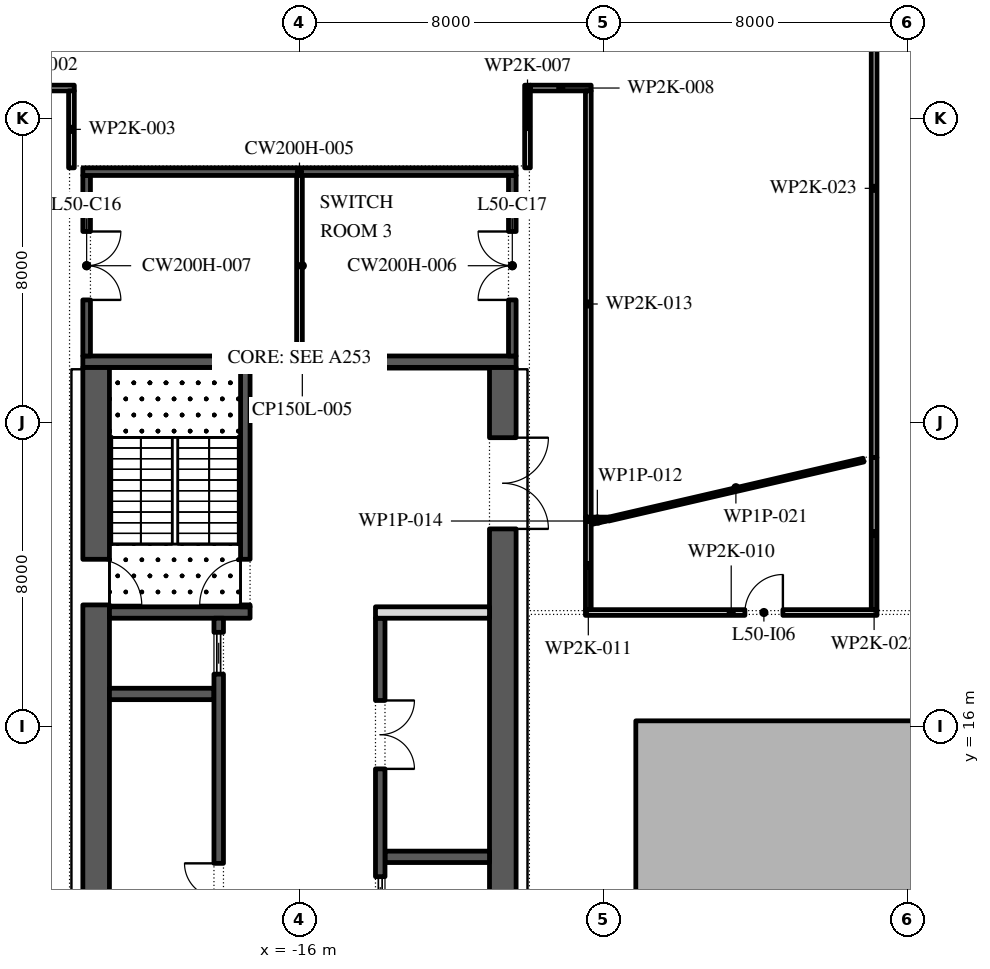
"""IFC4 building model, lengths in metres.
Left out: names, types, materials, properties, quantities, classifications, styles, units other than length and angle.
Written with IfcOpenShell. Run it as: python <this file> out.ifc"""

import sys

from ifc_helpers import new_model, si_unit, direction, frame, frame_2d, origin, place, context, subcontext, project, spatial, polyline, rectangle, outline, extrude, element, fill, save


model = new_model("IFC4")
c1 = context("Model", 3, precision=1e-05, world=origin(), true_north=direction((0.0, 1.0)))
c2 = subcontext(c1, "Body", "Model", "MODEL_VIEW")
j1 = project(units=[si_unit("LENGTHUNIT", "METRE"), si_unit("PLANEANGLEUNIT", "RADIAN")], contexts=[c1])
p1 = place(None, origin())
s1 = spatial("IfcSite", under=j1, at=p1, CompositionType="ELEMENT")
p2 = place(p1, origin())
s2 = spatial("IfcBuilding", under=s1, at=p2, CompositionType="ELEMENT")
p3 = place(p2, frame((0.0, 0.0, 226.2)))
s3 = spatial("IfcBuildingStorey", under=s2, at=p3, CompositionType="ELEMENT", Elevation=226.2)
p4 = place(p3, origin())
e1 = element("IfcWall", 1, at=p4, inside=s3, PredefinedType="STANDARD", context=c2, shape_type="SweptSolid", body=[
    extrude(outline(polyline([(-7.15, -2.15), (7.15, -2.15), (7.15, 16.15), (-7.15, 16.15), (-7.15, -2.15)]), holes=[polyline([(-7.0, -2.0), (-7.0, 16.0), (7.0, 16.0), (7.0, -2.0), (-7.0, -2.0)])]), origin(), (0.0, 0.0, 1.0), 10.35),
])
p5 = place(p3, frame((-21.35, -2.45, 0.0), z_axis=(0.0, 0.0, 1.0), x_axis=(0.0, 1.0, 0.0)))
e2 = element("IfcWall", 2, at=p5, inside=s3, PredefinedType="SHEAR", context=c2, shape_type="SweptSolid", body=[
    extrude(rectangle(XDim=27.9, YDim=0.7, at=frame_2d((13.95, 0.0))), origin(), (0.0, 0.0, 1.0), 10.35),
])
p6 = place(p5, frame((5.05, 0.0, 0.0)))
e3 = element("IfcOpeningElement", 3, at=p6, cuts=e2, PredefinedType="OPENING", context=c2, shape_type="SweptSolid", body=[
    extrude(rectangle(XDim=1.2, YDim=2.1, at=frame_2d((0.6, 1.05))), frame((0.0, 0.36, 0.0), z_axis=(0.0, -1.0, 0.0), x_axis=(1.0, 0.0, 0.0)), (0.0, 0.0, 1.0), 0.72),
])
p7 = place(p5, frame((21.65, 0.0, 0.0)))
e4 = element("IfcOpeningElement", 4, at=p7, cuts=e2, PredefinedType="OPENING", context=c2, shape_type="SweptSolid", body=[
    extrude(rectangle(XDim=1.2, YDim=2.1, at=frame_2d((0.6, 1.05))), frame((0.0, 0.36, 0.0), z_axis=(0.0, -1.0, 0.0), x_axis=(1.0, 0.0, 0.0)), (0.0, 0.0, 1.0), 0.72),
])
p8 = place(p3, frame((-10.65, -2.45, 0.0), z_axis=(0.0, 0.0, 1.0), x_axis=(0.0, 1.0, 0.0)))
e5 = element("IfcWall", 5, at=p8, inside=s3, PredefinedType="SHEAR", context=c2, shape_type="SweptSolid", body=[
    extrude(rectangle(XDim=27.9, YDim=0.7, at=frame_2d((13.95, 0.0))), origin(), (0.0, 0.0, 1.0), 10.35),
])
p9 = place(p8, frame((23.65, 0.0, 0.0)))
e6 = element("IfcOpeningElement", 6, at=p9, cuts=e5, PredefinedType="OPENING", context=c2, shape_type="SweptSolid", body=[
    extrude(rectangle(XDim=2.4, YDim=2.1, at=frame_2d((1.2, 1.05))), frame((0.0, 0.36, 0.0), z_axis=(0.0, -1.0, 0.0), x_axis=(1.0, 0.0, 0.0)), (0.0, 0.0, 1.0), 0.72),
])
p10 = place(p8, frame((2.25, 0.0, 0.0)))
e7 = element("IfcOpeningElement", 7, at=p10, cuts=e5, PredefinedType="OPENING", context=c2, shape_type="SweptSolid", body=[
    extrude(rectangle(XDim=1.8, YDim=2.4, at=frame_2d((0.9, 1.2))), frame((0.0, 0.36, 0.0), z_axis=(0.0, -1.0, 0.0), x_axis=(1.0, 0.0, 0.0)), (0.0, 0.0, 1.0), 0.72),
])
p11 = place(p3, frame((-21.7, 25.6, 0.0), z_axis=(0.0, 0.0, 1.0), x_axis=(1.0, 0.0, 0.0)))
e8 = element("IfcWall", 8, at=p11, inside=s3, PredefinedType="SHEAR", context=c2, shape_type="SweptSolid", body=[
    extrude(rectangle(XDim=11.4, YDim=0.3, at=frame_2d((5.7, 0.0))), origin(), (0.0, 0.0, 1.0), 10.35),
])
p12 = place(p3, frame((-21.0, 19.0, 0.0), z_axis=(0.0, 0.0, 1.0), x_axis=(1.0, 0.0, 0.0)))
e9 = element("IfcWall", 9, at=p12, inside=s3, PredefinedType="SHEAR", context=c2, shape_type="SweptSolid", body=[
    extrude(rectangle(XDim=3.7, YDim=0.3, at=frame_2d((1.85, 0.0))), origin(), (0.0, 0.0, 1.0), 10.35),
])
p13 = place(p3, frame((-17.425, 19.15, 0.0), z_axis=(0.0, 0.0, 1.0), x_axis=(0.0, 1.0, 0.0)))
e10 = element("IfcWall", 10, at=p13, inside=s3, PredefinedType="SHEAR", context=c2, shape_type="SweptSolid", body=[
    extrude(rectangle(XDim=6.3, YDim=0.25, at=frame_2d((3.15, 0.0))), origin(), (0.0, 0.0, 1.0), 10.35),
])
p14 = place(p13, frame((0.05, 0.0, 0.0)))
e11 = element("IfcOpeningElement", 11, at=p14, cuts=e10, PredefinedType="OPENING", context=c2, shape_type="SweptSolid", body=[
    extrude(rectangle(XDim=1.2, YDim=2.1, at=frame_2d((0.6, 1.05))), frame((0.0, 0.135, 0.0), z_axis=(0.0, -1.0, 0.0), x_axis=(1.0, 0.0, 0.0)), (0.0, 0.0, 1.0), 0.27),
])
p15 = place(p3, frame((-21.0, 16.857, 0.0), z_axis=(0.0, 0.0, 1.0), x_axis=(1.0, 0.0, 0.0)))
e12 = element("IfcWall", 12, at=p15, inside=s3, PredefinedType="SHEAR", context=c2, shape_type="SweptSolid", body=[
    extrude(rectangle(XDim=2.75, YDim=0.3, at=frame_2d((1.375, 0.0))), origin(), (0.0, 0.0, 1.0), 10.35),
])
p16 = place(p3, frame((-18.125, 4.15, 0.0), z_axis=(0.0, 0.0, 1.0), x_axis=(0.0, 1.0, 0.0)))
e13 = element("IfcWall", 13, at=p16, inside=s3, PredefinedType="SHEAR", context=c2, shape_type="SweptSolid", body=[
    extrude(rectangle(XDim=14.7, YDim=0.25, at=frame_2d((7.35, 0.0))), origin(), (0.0, 0.0, 1.0), 10.35),
])
p17 = place(p16, frame((6.45, 0.0, 0.0)))
e14 = element("IfcOpeningElement", 14, at=p17, cuts=e13, PredefinedType="OPENING", context=c2, shape_type="SweptSolid", body=[
    extrude(rectangle(XDim=1.8, YDim=2.4, at=frame_2d((0.9, 1.2))), frame((0.0, 0.135, 0.0), z_axis=(0.0, -1.0, 0.0), x_axis=(1.0, 0.0, 0.0)), (0.0, 0.0, 1.0), 0.27),
])
p18 = place(p16, frame((0.371, 0.0, 0.0)))
e15 = element("IfcOpeningElement", 15, at=p18, cuts=e13, PredefinedType="OPENING", context=c2, shape_type="SweptSolid", body=[
    extrude(rectangle(XDim=1.1, YDim=2.1, at=frame_2d((0.55, 1.05))), frame((0.0, 0.135, 0.0), z_axis=(0.0, -1.0, 0.0), x_axis=(1.0, 0.0, 0.0)), (0.0, 0.0, 1.0), 0.27),
])
p19 = place(p16, frame((13.229, 0.0, 0.0)))
e16 = element("IfcOpeningElement", 16, at=p19, cuts=e13, PredefinedType="OPENING", context=c2, shape_type="SweptSolid", body=[
    extrude(rectangle(XDim=1.1, YDim=2.1, at=frame_2d((0.55, 1.05))), frame((0.0, 0.135, 0.0), z_axis=(0.0, -1.0, 0.0), x_axis=(1.0, 0.0, 0.0)), (0.0, 0.0, 1.0), 0.27),
])
p20 = place(p3, frame((-13.75, 12.571, 0.0), z_axis=(0.0, 0.0, 1.0), x_axis=(1.0, 0.0, 0.0)))
e17 = element("IfcWall", 17, at=p20, inside=s3, PredefinedType="SHEAR", context=c2, shape_type="SweptSolid", body=[
    extrude(rectangle(XDim=2.75, YDim=0.3, at=frame_2d((1.375, 0.0))), origin(), (0.0, 0.0, 1.0), 10.35),
])
p21 = place(p3, frame((-13.875, -2.45, 0.0), z_axis=(0.0, 0.0, 1.0), x_axis=(0.0, 1.0, 0.0)))
e18 = element("IfcWall", 18, at=p21, inside=s3, PredefinedType="SHEAR", context=c2, shape_type="SweptSolid", body=[
    extrude(rectangle(XDim=21.3, YDim=0.25, at=frame_2d((10.65, 0.0))), origin(), (0.0, 0.0, 1.0), 10.35),
])
p22 = place(p21, frame((17.336, 0.0, 0.0)))
e19 = element("IfcOpeningElement", 19, at=p22, cuts=e18, PredefinedType="OPENING", context=c2, shape_type="SweptSolid", body=[
    extrude(rectangle(XDim=1.8, YDim=2.4, at=frame_2d((0.9, 1.2))), frame((0.0, 0.135, 0.0), z_axis=(0.0, -1.0, 0.0), x_axis=(1.0, 0.0, 0.0)), (0.0, 0.0, 1.0), 0.27),
])
p23 = place(p21, frame((6.971, 0.0, 0.0)))
e20 = element("IfcOpeningElement", 20, at=p23, cuts=e18, PredefinedType="OPENING", context=c2, shape_type="SweptSolid", body=[
    extrude(rectangle(XDim=1.1, YDim=2.1, at=frame_2d((0.55, 1.05))), frame((0.0, 0.135, 0.0), z_axis=(0.0, -1.0, 0.0), x_axis=(1.0, 0.0, 0.0)), (0.0, 0.0, 1.0), 0.27),
])
p24 = place(p21, frame((9.114, 0.0, 0.0)))
e21 = element("IfcOpeningElement", 21, at=p24, cuts=e18, PredefinedType="OPENING", context=c2, shape_type="SweptSolid", body=[
    extrude(rectangle(XDim=1.1, YDim=2.1, at=frame_2d((0.55, 1.05))), frame((0.0, 0.135, 0.0), z_axis=(0.0, -1.0, 0.0), x_axis=(1.0, 0.0, 0.0)), (0.0, 0.0, 1.0), 0.27),
])
p25 = place(p21, frame((11.257, 0.0, 0.0)))
e22 = element("IfcOpeningElement", 22, at=p25, cuts=e18, PredefinedType="OPENING", context=c2, shape_type="SweptSolid", body=[
    extrude(rectangle(XDim=1.1, YDim=2.1, at=frame_2d((0.55, 1.05))), frame((0.0, 0.135, 0.0), z_axis=(0.0, -1.0, 0.0), x_axis=(1.0, 0.0, 0.0)), (0.0, 0.0, 1.0), 0.27),
])
p26 = place(p21, frame((13.4, 0.0, 0.0)))
e23 = element("IfcOpeningElement", 23, at=p26, cuts=e18, PredefinedType="OPENING", context=c2, shape_type="SweptSolid", body=[
    extrude(rectangle(XDim=1.1, YDim=2.1, at=frame_2d((0.55, 1.05))), frame((0.0, 0.135, 0.0), z_axis=(0.0, -1.0, 0.0), x_axis=(1.0, 0.0, 0.0)), (0.0, 0.0, 1.0), 0.27),
])
p27 = place(p3, frame((-14.0, 19.0, 0.0), z_axis=(0.0, 0.0, 1.0), x_axis=(1.0, 0.0, 0.0)))
e24 = element("IfcWall", 24, at=p27, inside=s3, PredefinedType="PARTITIONING", context=c2, shape_type="SweptSolid", body=[
    extrude(rectangle(XDim=3.0, YDim=0.3, at=frame_2d((1.5, 0.0))), origin(), (0.0, 0.0, 1.0), 10.35),
])
p28 = place(p3, frame((-21.6, 25.75, 0.0), z_axis=(0.0, 0.0, 1.0), x_axis=(0.0, 1.0, 0.0)))
e25 = element("IfcWall", 25, at=p28, inside=s3, PredefinedType="SHEAR", context=c2, shape_type="SweptSolid", body=[
    extrude(rectangle(XDim=4.75, YDim=0.2, at=frame_2d((2.375, 0.0))), origin(), (0.0, 0.0, 1.0), 10.35),
])
p29 = place(p28, frame((1.475, 0.0, 0.0)))
e26 = element("IfcOpeningElement", 26, at=p29, cuts=e25, PredefinedType="OPENING", context=c2, shape_type="SweptSolid", body=[
    extrude(rectangle(XDim=1.8, YDim=2.4, at=frame_2d((0.9, 1.2))), frame((0.0, 0.11, 0.0), z_axis=(0.0, -1.0, 0.0), x_axis=(1.0, 0.0, 0.0)), (0.0, 0.0, 1.0), 0.22),
])
p30 = place(p3, frame((-10.4, 25.75, 0.0), z_axis=(0.0, 0.0, 1.0), x_axis=(0.0, 1.0, 0.0)))
e27 = element("IfcWall", 27, at=p30, inside=s3, PredefinedType="SHEAR", context=c2, shape_type="SweptSolid", body=[
    extrude(rectangle(XDim=4.75, YDim=0.2, at=frame_2d((2.375, 0.0))), origin(), (0.0, 0.0, 1.0), 10.35),
])
p31 = place(p30, frame((1.475, 0.0, 0.0)))
e28 = element("IfcOpeningElement", 28, at=p31, cuts=e27, PredefinedType="OPENING", context=c2, shape_type="SweptSolid", body=[
    extrude(rectangle(XDim=1.8, YDim=2.4, at=frame_2d((0.9, 1.2))), frame((0.0, 0.11, 0.0), z_axis=(0.0, -1.0, 0.0), x_axis=(1.0, 0.0, 0.0)), (0.0, 0.0, 1.0), 0.22),
])
p32 = place(p3, frame((-21.7, 30.6, 0.0), z_axis=(0.0, 0.0, 1.0), x_axis=(1.0, 0.0, 0.0)))
e29 = element("IfcWall", 29, at=p32, inside=s3, PredefinedType="SHEAR", context=c2, shape_type="SweptSolid", body=[
    extrude(rectangle(XDim=11.4, YDim=0.2, at=frame_2d((5.7, 0.0))), origin(), (0.0, 0.0, 1.0), 10.35),
])
p33 = place(p3, frame((-16.0, 25.75, 0.0), z_axis=(0.0, 0.0, 1.0), x_axis=(0.0, 1.0, 0.0)))
e30 = element("IfcWall", 30, at=p33, inside=s3, PredefinedType="PARTITIONING", context=c2, shape_type="SweptSolid", body=[
    extrude(rectangle(XDim=4.75, YDim=0.15, at=frame_2d((2.375, 0.0))), origin(), (0.0, 0.0, 1.0), 10.35),
])
p34 = place(p3, frame((-24.025, 32.8, 0.0), z_axis=(0.0, 0.0, 1.0), x_axis=(1.0, 0.0, 0.0)))
e31 = element("IfcWall", 31, at=p34, inside=s3, PredefinedType="PARTITIONING", context=c2, shape_type="SweptSolid", body=[
    extrude(rectangle(XDim=2.1, YDim=0.15, at=frame_2d((1.05, 0.0))), origin(), (0.0, 0.0, 1.0), 10.35),
])
p35 = place(p3, frame((-22.0, 32.725, 0.0), z_axis=(0.0, 0.0, 1.0), x_axis=(0.0, -1.0, 0.0)))
e32 = element("IfcWall", 32, at=p35, inside=s3, PredefinedType="PARTITIONING", context=c2, shape_type="SweptSolid", body=[
    extrude(rectangle(XDim=2.025, YDim=0.15, at=frame_2d((1.013, 0.0))), origin(), (0.0, 0.0, 1.0), 10.35),
])
p36 = place(p3, frame((-10.0, 30.7, 0.0), z_axis=(0.0, 0.0, 1.0), x_axis=(0.0, 1.0, 0.0)))
e33 = element("IfcWall", 33, at=p36, inside=s3, PredefinedType="PARTITIONING", context=c2, shape_type="SweptSolid", body=[
    extrude(rectangle(XDim=2.175, YDim=0.15, at=frame_2d((1.087, 0.0))), origin(), (0.0, 0.0, 1.0), 10.35),
])
p37 = place(p3, frame((-9.925, 32.8, 0.0), z_axis=(0.0, 0.0, 1.0), x_axis=(1.0, 0.0, 0.0)))
e34 = element("IfcWall", 34, at=p37, inside=s3, PredefinedType="PARTITIONING", context=c2, shape_type="SweptSolid", body=[
    extrude(rectangle(XDim=1.6, YDim=0.15, at=frame_2d((0.8, 0.0))), origin(), (0.0, 0.0, 1.0), 10.35),
])
p38 = place(p3, frame((-8.475, 19.0, 0.0), z_axis=(0.0, 0.0, 1.0), x_axis=(1.0, 0.0, 0.0)))
e35 = element("IfcWall", 35, at=p38, inside=s3, PredefinedType="PARTITIONING", context=c2, shape_type="SweptSolid", body=[
    extrude(rectangle(XDim=7.67, YDim=0.15, at=frame_2d((3.835, 0.0))), origin(), (0.0, 0.0, 1.0), 10.35),
])
p39 = place(p38, frame((4.195, 0.0, 0.0)))
e36 = element("IfcOpeningElement", 36, at=p39, cuts=e35, PredefinedType="OPENING", context=c2, shape_type="SweptSolid", body=[
    extrude(rectangle(XDim=1.0, YDim=2.1, at=frame_2d((0.5, 1.05))), frame((0.0, 0.085, 0.0), z_axis=(0.0, -1.0, 0.0), x_axis=(1.0, 0.0, 0.0)), (0.0, 0.0, 1.0), 0.17),
])
p40 = place(p3, frame((-8.4, 21.4, 0.0), z_axis=(0.0, 0.0, 1.0), x_axis=(0.0, -1.0, 0.0)))
e37 = element("IfcWall", 37, at=p40, inside=s3, PredefinedType="PARTITIONING", context=c2, shape_type="SweptSolid", body=[
    extrude(rectangle(XDim=2.325, YDim=0.15, at=frame_2d((1.163, 0.0))), origin(), (0.0, 0.0, 1.0), 10.35),
])
p41 = place(p3, frame((-8.475, 21.46, 0.0), z_axis=(0.0, 0.0, 1.0), x_axis=(1.0, 0.0, 0.0)))
e38 = element("IfcWall", 38, at=p41, inside=s3, PredefinedType="PARTITIONING", context=c2, shape_type="SweptSolid", body=[
    extrude(rectangle(XDim=0.625, YDim=0.1, at=frame_2d((0.312, 0.0))), origin(), (0.0, 0.0, 1.0), 10.35),
])
p42 = place(p3, frame((-8.4, 32.725, 0.0), z_axis=(0.0, 0.0, 1.0), x_axis=(0.0, -1.0, 0.0)))
e39 = element("IfcWall", 39, at=p42, inside=s3, PredefinedType="PARTITIONING", context=c2, shape_type="SweptSolid", body=[
    extrude(rectangle(XDim=11.215, YDim=0.15, at=frame_2d((5.607, 0.0))), origin(), (0.0, 0.0, 1.0), 10.35),
])
p43 = place(p3, frame((-7.949, 21.449, 0.0), z_axis=(0.0, 0.0, 1.0), x_axis=(-0.976718553607, -0.214524746916, 0.0)))
e40 = element("IfcWall", 40, at=p43, inside=s3, PredefinedType="PARTITIONING", context=c2, shape_type="SweptSolid", body=[
    extrude(rectangle(XDim=0.387, YDim=0.1, at=frame_2d((0.193, 0.0))), origin(), (0.0, 0.0, 1.0), 10.35),
])
p44 = place(p3, frame((-1.16, 23.01, 0.0), z_axis=(0.0, 0.0, 1.0), x_axis=(-0.974232791095, -0.225544826486, 0.0)))
e41 = element("IfcWall", 41, at=p44, inside=s3, PredefinedType="PARTITIONING", context=c2, shape_type="SweptSolid", body=[
    extrude(rectangle(XDim=6.868, YDim=0.1, at=frame_2d((3.434, 0.0))), origin(), (0.0, 0.0, 1.0), 10.35),
])
p45 = place(p3, frame((-0.88, 19.075, 0.0), z_axis=(0.0, 0.0, 1.0), x_axis=(0.0, 1.0, 0.0)))
e42 = element("IfcWall", 42, at=p45, inside=s3, PredefinedType="PARTITIONING", context=c2, shape_type="SweptSolid", body=[
    extrude(rectangle(XDim=4.005, YDim=0.15, at=frame_2d((2.002, 0.0))), origin(), (0.0, 0.0, 1.0), 10.35),
])
p46 = place(p3, frame((-0.88, 23.08, 0.0), z_axis=(0.0, 0.0, 1.0), x_axis=(0.0, 1.0, 0.0)))
e43 = element("IfcWall", 43, at=p46, inside=s3, PredefinedType="PARTITIONING", context=c2, shape_type="SweptSolid", body=[
    extrude(rectangle(XDim=14.161, YDim=0.15, at=frame_2d((7.081, 0.0))), origin(), (0.0, 0.0, 1.0), 10.35),
])
p47 = place(p17, origin())
e44 = element("IfcDoor", 44, at=p47, inside=s3, OperationType="DOUBLE_DOOR_SINGLE_SWING", PredefinedType="DOOR", context=c2, shape_type="SweptSolid", body=[
    extrude(rectangle(XDim=1.8, YDim=2.4, at=frame_2d((0.9, 1.2))), frame((0.0, 0.125, 0.0), z_axis=(0.0, -1.0, 0.0), x_axis=(1.0, 0.0, 0.0)), (0.0, 0.0, 1.0), 0.05),
])
fill(e14, e44)
p48 = place(p19, origin())
e45 = element("IfcDoor", 45, at=p48, inside=s3, OperationType="SLIDING_TO_LEFT", PredefinedType="DOOR", context=c2, shape_type="SweptSolid", body=[
    extrude(rectangle(XDim=1.1, YDim=2.1, at=frame_2d((0.55, 1.05))), frame((0.0, 0.025, 0.0), z_axis=(0.0, -1.0, 0.0), x_axis=(1.0, 0.0, 0.0)), (0.0, 0.0, 1.0), 0.05),
])
fill(e16, e45)
p49 = place(p22, frame((1.8, -0.2, 0.0), z_axis=(0.0, 0.0, 1.0), x_axis=(-1.0, 0.0, 0.0)))
e46 = element("IfcDoor", 46, at=p49, inside=s3, OperationType="DOUBLE_DOOR_SINGLE_SWING", PredefinedType="DOOR", context=c2, shape_type="SweptSolid", body=[
    extrude(rectangle(XDim=1.8, YDim=2.4, at=frame_2d((0.9, 1.2))), frame((0.0, -0.075, 0.0), z_axis=(0.0, -1.0, 0.0), x_axis=(1.0, 0.0, 0.0)), (0.0, 0.0, 1.0), 0.05),
])
fill(e19, e46)
p50 = place(p26, origin())
e47 = element("IfcDoor", 47, at=p50, inside=s3, OperationType="SLIDING_TO_LEFT", PredefinedType="DOOR", context=c2, shape_type="SweptSolid", body=[
    extrude(rectangle(XDim=1.1, YDim=2.1, at=frame_2d((0.55, 1.05))), frame((0.0, 0.025, 0.0), z_axis=(0.0, -1.0, 0.0), x_axis=(1.0, 0.0, 0.0)), (0.0, 0.0, 1.0), 0.05),
])
fill(e23, e47)
p51 = place(p9, frame((2.4, 0.0, 0.0), z_axis=(0.0, 0.0, 1.0), x_axis=(-1.0, 0.0, 0.0)))
e48 = element("IfcDoor", 48, at=p51, inside=s3, OperationType="DOUBLE_DOOR_SINGLE_SWING", PredefinedType="DOOR", context=c2, shape_type="SweptSolid", body=[
    extrude(rectangle(XDim=2.4, YDim=2.1, at=frame_2d((1.2, 1.05))), frame((0.0, 0.025, 0.0), z_axis=(0.0, -1.0, 0.0), x_axis=(1.0, 0.0, 0.0)), (0.0, 0.0, 1.0), 0.05),
])
fill(e6, e48)
p52 = place(p14, origin())
e49 = element("IfcDoor", 49, at=p52, inside=s3, OperationType="SINGLE_SWING_RIGHT", PredefinedType="DOOR", context=c2, shape_type="SweptSolid", body=[
    extrude(rectangle(XDim=1.2, YDim=2.1, at=frame_2d((0.6, 1.05))), frame((0.0, 0.025, 0.0), z_axis=(0.0, -1.0, 0.0), x_axis=(1.0, 0.0, 0.0)), (0.0, 0.0, 1.0), 0.05),
])
fill(e11, e49)
p53 = place(p7, frame((1.2, 0.0, 0.0), z_axis=(0.0, 0.0, 1.0), x_axis=(-1.0, 0.0, 0.0)))
e50 = element("IfcDoor", 50, at=p53, inside=s3, OperationType="SINGLE_SWING_LEFT", PredefinedType="DOOR", context=c2, shape_type="SweptSolid", body=[
    extrude(rectangle(XDim=1.2, YDim=2.1, at=frame_2d((0.6, 1.05))), frame((0.0, 0.025, 0.0), z_axis=(0.0, -1.0, 0.0), x_axis=(1.0, 0.0, 0.0)), (0.0, 0.0, 1.0), 0.05),
])
fill(e4, e50)
p54 = place(p29, frame((1.8, -0.15, 0.0), z_axis=(0.0, 0.0, 1.0), x_axis=(-1.0, 0.0, 0.0)))
e51 = element("IfcDoor", 51, at=p54, inside=s3, OperationType="DOUBLE_DOOR_SINGLE_SWING", PredefinedType="DOOR", context=c2, shape_type="SweptSolid", body=[
    extrude(rectangle(XDim=1.8, YDim=2.4, at=frame_2d((0.9, 1.2))), frame((0.0, -0.05, 0.0), z_axis=(0.0, -1.0, 0.0), x_axis=(1.0, 0.0, 0.0)), (0.0, 0.0, 1.0), 0.05),
])
fill(e26, e51)
p55 = place(p31, origin())
e52 = element("IfcDoor", 52, at=p55, inside=s3, OperationType="DOUBLE_DOOR_SINGLE_SWING", PredefinedType="DOOR", context=c2, shape_type="SweptSolid", body=[
    extrude(rectangle(XDim=1.8, YDim=2.4, at=frame_2d((0.9, 1.2))), frame((0.0, 0.1, 0.0), z_axis=(0.0, -1.0, 0.0), x_axis=(1.0, 0.0, 0.0)), (0.0, 0.0, 1.0), 0.05),
])
fill(e28, e52)
p56 = place(p39, origin())
e53 = element("IfcDoor", 53, at=p56, inside=s3, OperationType="SINGLE_SWING_LEFT", PredefinedType="DOOR", context=c2, shape_type="SweptSolid", body=[
    extrude(rectangle(XDim=1.0, YDim=2.1, at=frame_2d((0.5, 1.05))), frame((0.0, 0.025, 0.0), z_axis=(0.0, -1.0, 0.0), x_axis=(1.0, 0.0, 0.0)), (0.0, 0.0, 1.0), 0.05),
])
fill(e36, e53)
save(model, sys.argv[1])
